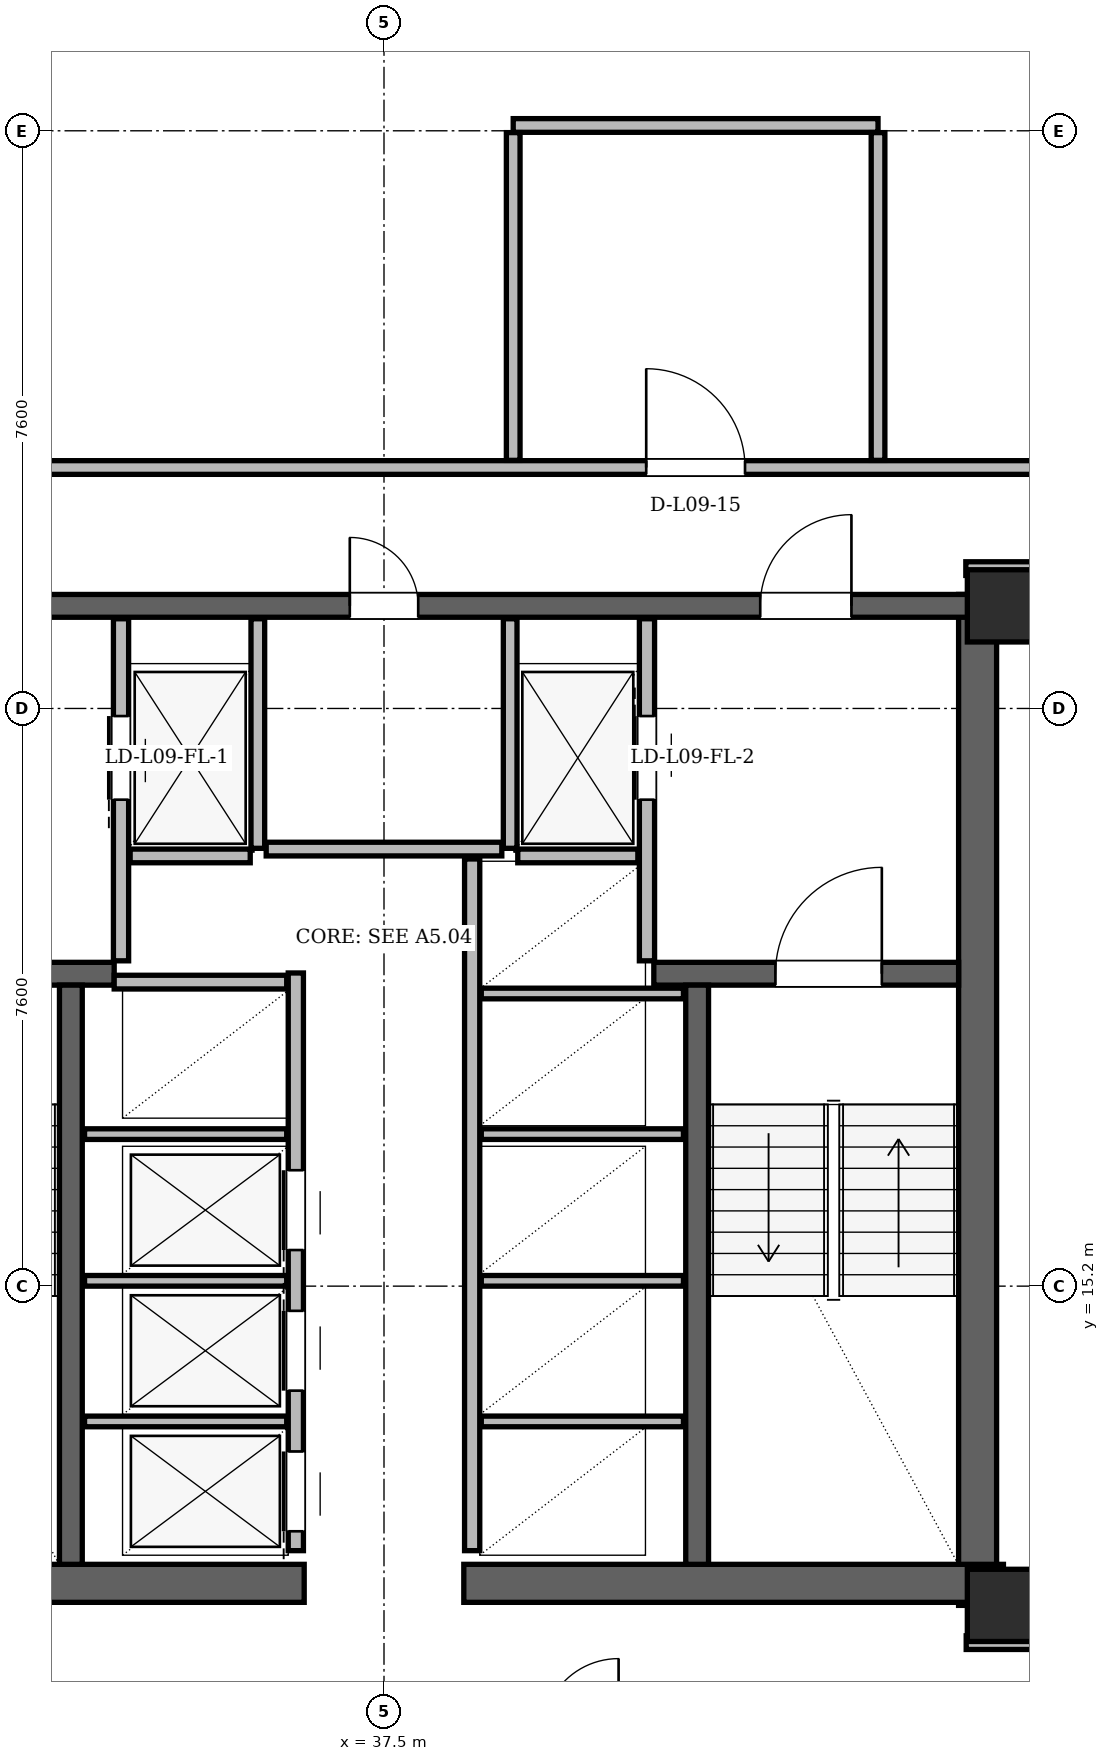
"""IFC4 building model, lengths in metres.
Left out: names, types, materials, properties, quantities, classifications, styles, units other than length and angle.
Written with IfcOpenShell. Run it as: python <this file> out.ifc"""

import sys

from ifc_helpers import new_model, si_unit, direction, frame, frame_2d, origin, origin_2d, place, context, subcontext, project, spatial, rectangle, hollow_rectangle, extrude, element, fill, save


model = new_model("IFC4")
c1 = context("Model", 3, precision=1e-05, world=origin(), true_north=direction((0.0, 1.0)))
c2 = subcontext(c1, "Body", "Model", "MODEL_VIEW")
j1 = project(units=[si_unit("LENGTHUNIT", "METRE"), si_unit("PLANEANGLEUNIT", "RADIAN")], contexts=[c1])
p1 = place(None, origin())
s1 = spatial("IfcSite", under=j1, at=p1, CompositionType="ELEMENT")
p2 = place(p1, origin())
s2 = spatial("IfcBuilding", under=s1, at=p2, CompositionType="ELEMENT")
p3 = place(p2, frame((0.0, 0.0, 38.1)))
s3 = spatial("IfcBuildingStorey", under=s2, at=p3, CompositionType="ELEMENT", Elevation=38.1)
for number, where, z_axis, x_axis in (
    (1, (45.65, 11.0, 0.0), (0.0, 0.0, 1.0), (1.0, 0.0, 0.0)),
    (2, (45.65, 24.15, 0.0), (0.0, 0.0, 1.0), (1.0, 0.0, 0.0)),
):
    element("IfcColumn", number, at=place(p3, frame(where, z_axis=z_axis, x_axis=x_axis)), inside=s3, PredefinedType="COLUMN", context=c2, shape_type="SweptSolid", body=[
        extrude(hollow_rectangle(XDim=0.95, YDim=0.95, WallThickness=0.08, at=origin_2d()), origin(), (0.0, 0.0, 1.0), 3.6),
    ])
p4 = place(p3, frame((45.31, 11.0, 0.0), z_axis=(0.0, 0.0, 1.0), x_axis=(0.0, 1.0, 0.0)))
e3 = element("IfcWall", 3, at=p4, inside=s3, PredefinedType="SHEAR", context=c2, shape_type="SweptSolid", body=[
    extrude(rectangle(XDim=13.3, YDim=0.5, at=frame_2d((6.65, 0.0))), origin(), (0.0, 0.0, 1.0), 3.36),
])
for number, where, z_axis, x_axis in (
    (4, (29.35, 11.29, 0.0), (0.0, 0.0, 1.0), (1.0, 0.0, 0.0)),
    (5, (38.55, 11.29, 0.0), (0.0, 0.0, 1.0), (1.0, 0.0, 0.0)),
):
    element("IfcWall", number, at=place(p3, frame(where, z_axis=z_axis, x_axis=x_axis)), inside=s3, PredefinedType="SHEAR", context=c2, shape_type="SweptSolid", body=[
        extrude(rectangle(XDim=7.1, YDim=0.5, at=frame_2d((3.55, 0.0))), origin(), (0.0, 0.0, 1.0), 3.36),
    ])
p5 = place(p3, frame((29.65, 24.15, 0.0), z_axis=(0.0, 0.0, 1.0), x_axis=(1.0, 0.0, 0.0)))
e6 = element("IfcWall", 6, at=p5, inside=s3, PredefinedType="SHEAR", context=c2, shape_type="SweptSolid", body=[
    extrude(rectangle(XDim=15.7, YDim=0.3, at=frame_2d((7.85, 0.0))), origin(), (0.0, 0.0, 1.0), 3.36),
])
p6 = place(p5, frame((1.7, 0.0, 0.0)))
e7 = element("IfcOpeningElement", 7, at=p6, cuts=e6, PredefinedType="OPENING", context=c2, shape_type="SweptSolid", body=[
    extrude(rectangle(XDim=1.2, YDim=2.2, at=frame_2d((0.6, 1.1))), frame((0.0, 0.15, 0.0), z_axis=(0.0, -1.0, 0.0), x_axis=(1.0, 0.0, 0.0)), (0.0, 0.0, 1.0), 0.3),
])
p7 = place(p5, frame((12.8, 0.0, 0.0)))
e8 = element("IfcOpeningElement", 8, at=p7, cuts=e6, PredefinedType="OPENING", context=c2, shape_type="SweptSolid", body=[
    extrude(rectangle(XDim=1.2, YDim=2.2, at=frame_2d((0.6, 1.1))), frame((0.0, 0.15, 0.0), z_axis=(0.0, -1.0, 0.0), x_axis=(1.0, 0.0, 0.0)), (0.0, 0.0, 1.0), 0.3),
])
p8 = place(p5, frame((7.4, 0.0, 0.0)))
e9 = element("IfcOpeningElement", 9, at=p8, cuts=e6, PredefinedType="OPENING", context=c2, shape_type="SweptSolid", body=[
    extrude(rectangle(XDim=0.9, YDim=2.05, at=frame_2d((0.45, 1.025))), frame((0.0, 0.15, 0.0), z_axis=(0.0, -1.0, 0.0), x_axis=(1.0, 0.0, 0.0)), (0.0, 0.0, 1.0), 0.3),
])
p9 = place(p3, frame((29.94, 19.31, 0.0), z_axis=(0.0, 0.0, 1.0), x_axis=(1.0, 0.0, 0.0)))
e10 = element("IfcWall", 10, at=p9, inside=s3, PredefinedType="SHEAR", context=c2, shape_type="SweptSolid", body=[
    extrude(rectangle(XDim=4.01, YDim=0.3, at=frame_2d((2.005, 0.0))), origin(), (0.0, 0.0, 1.0), 3.36),
])
p10 = place(p9, frame((1.01, 0.0, 0.0)))
e11 = element("IfcOpeningElement", 11, at=p10, cuts=e10, PredefinedType="OPENING", context=c2, shape_type="SweptSolid", body=[
    extrude(rectangle(XDim=1.4, YDim=2.2, at=frame_2d((0.7, 1.1))), frame((0.0, 0.15, 0.0), z_axis=(0.0, -1.0, 0.0), x_axis=(1.0, 0.0, 0.0)), (0.0, 0.0, 1.0), 0.3),
])
p11 = place(p3, frame((41.05, 19.31, 0.0), z_axis=(0.0, 0.0, 1.0), x_axis=(1.0, 0.0, 0.0)))
e12 = element("IfcWall", 12, at=p11, inside=s3, PredefinedType="SHEAR", context=c2, shape_type="SweptSolid", body=[
    extrude(rectangle(XDim=4.01, YDim=0.3, at=frame_2d((2.005, 0.0))), origin(), (0.0, 0.0, 1.0), 3.36),
])
p12 = place(p11, frame((1.6, 0.0, 0.0)))
e13 = element("IfcOpeningElement", 13, at=p12, cuts=e12, PredefinedType="OPENING", context=c2, shape_type="SweptSolid", body=[
    extrude(rectangle(XDim=1.4, YDim=2.2, at=frame_2d((0.7, 1.1))), frame((0.0, 0.15, 0.0), z_axis=(0.0, -1.0, 0.0), x_axis=(1.0, 0.0, 0.0)), (0.0, 0.0, 1.0), 0.3),
])
for number, where, z_axis, x_axis in (
    (14, (33.38, 11.54, 0.0), (0.0, 0.0, 1.0), (0.0, 1.0, 0.0)),
    (15, (41.62, 11.54, 0.0), (0.0, 0.0, 1.0), (0.0, 1.0, 0.0)),
):
    element("IfcWall", number, at=place(p3, frame(where, z_axis=z_axis, x_axis=x_axis)), inside=s3, PredefinedType="SHEAR", context=c2, shape_type="SweptSolid", body=[
        extrude(rectangle(XDim=7.62, YDim=0.3, at=frame_2d((3.81, 0.0))), origin(), (0.0, 0.0, 1.0), 3.36),
    ])
p13 = place(p3, frame((61.713, 15.014, 0.0), z_axis=(0.0, 0.0, 1.0), x_axis=(-0.499997221217, 0.86602700811, 0.0)))
e16 = element("IfcWall", 16, at=p13, inside=s3, PredefinedType="SOLIDWALL", context=c2, shape_type="SweptSolid", body=[
    extrude(rectangle(XDim=33.022, YDim=0.34, at=frame_2d((16.511, 0.0))), origin(), (0.0, 0.0, 1.0), 2.494),
])
p14 = place(p13, frame((7.404, 0.0, 0.0)))
e17 = element("IfcOpeningElement", 17, at=p14, cuts=e16, PredefinedType="OPENING", context=c2, shape_type="SweptSolid", body=[
    extrude(rectangle(XDim=1.5, YDim=2.2, at=frame_2d((0.75, 1.1))), frame((0.0, 0.17, 0.0), z_axis=(0.0, -1.0, 0.0), x_axis=(1.0, 0.0, 0.0)), (0.0, 0.0, 1.0), 0.34),
])
p15 = place(p13, frame((25.362, 0.0, 0.0)))
e18 = element("IfcOpeningElement", 18, at=p15, cuts=e16, PredefinedType="OPENING", context=c2, shape_type="SweptSolid", body=[
    extrude(rectangle(XDim=1.5, YDim=2.2, at=frame_2d((0.75, 1.1))), frame((0.0, 0.17, 0.0), z_axis=(0.0, -1.0, 0.0), x_axis=(1.0, 0.0, 0.0)), (0.0, 0.0, 1.0), 0.34),
])
p16 = place(p13, frame((1.657, 0.0, 0.85)))
e19 = element("IfcOpeningElement", 19, at=p16, cuts=e16, PredefinedType="OPENING", context=c2, shape_type="SweptSolid", body=[
    extrude(rectangle(XDim=1.2, YDim=1.48, at=frame_2d((0.6, 0.74))), frame((0.0, 0.17, 0.0), z_axis=(0.0, -1.0, 0.0), x_axis=(1.0, 0.0, 0.0)), (0.0, 0.0, 1.0), 0.34),
])
p17 = place(p13, frame((17.282, 0.0, 0.85)))
e20 = element("IfcOpeningElement", 20, at=p17, cuts=e16, PredefinedType="OPENING", context=c2, shape_type="SweptSolid", body=[
    extrude(rectangle(XDim=2.5, YDim=1.534, at=frame_2d((1.25, 0.767))), frame((0.0, 0.17, 0.0), z_axis=(0.0, -1.0, 0.0), x_axis=(1.0, 0.0, 0.0)), (0.0, 0.0, 1.0), 0.34),
])
p18 = place(p13, frame((10.692, 0.0, 0.85)))
e21 = element("IfcOpeningElement", 21, at=p18, cuts=e16, PredefinedType="OPENING", context=c2, shape_type="SweptSolid", body=[
    extrude(rectangle(XDim=1.2, YDim=1.48, at=frame_2d((0.6, 0.74))), frame((0.0, 0.17, 0.0), z_axis=(0.0, -1.0, 0.0), x_axis=(1.0, 0.0, 0.0)), (0.0, 0.0, 1.0), 0.34),
])
p19 = place(p13, frame((13.576, 0.0, 0.85)))
e22 = element("IfcOpeningElement", 22, at=p19, cuts=e16, PredefinedType="OPENING", context=c2, shape_type="SweptSolid", body=[
    extrude(rectangle(XDim=1.2, YDim=1.48, at=frame_2d((0.6, 0.74))), frame((0.0, 0.17, 0.0), z_axis=(0.0, -1.0, 0.0), x_axis=(1.0, 0.0, 0.0)), (0.0, 0.0, 1.0), 0.34),
])
p20 = place(p3, frame((34.04, 19.48, 0.0), z_axis=(0.0, 0.0, 1.0), x_axis=(0.0, 1.0, 0.0)))
e23 = element("IfcWall", 23, at=p20, inside=s3, PredefinedType="PARTITIONING", context=c2, shape_type="SweptSolid", body=[
    extrude(rectangle(XDim=4.5, YDim=0.2, at=frame_2d((2.25, 0.0))), origin(), (0.0, 0.0, 1.0), 2.4),
])
p21 = place(p20, frame((2.12, 0.0, 0.0)))
e24 = element("IfcOpeningElement", 24, at=p21, cuts=e23, PredefinedType="OPENING", context=c2, shape_type="SweptSolid", body=[
    extrude(rectangle(XDim=1.1, YDim=2.2, at=frame_2d((0.55, 1.1))), frame((0.0, 0.1, 0.0), z_axis=(0.0, -1.0, 0.0), x_axis=(1.0, 0.0, 0.0)), (0.0, 0.0, 1.0), 0.2),
])
p22 = place(p3, frame((35.84, 20.96, 0.0), z_axis=(0.0, 0.0, 1.0), x_axis=(0.0, 1.0, 0.0)))
e25 = element("IfcWall", 25, at=p22, inside=s3, PredefinedType="PARTITIONING", context=c2, shape_type="SweptSolid", body=[
    extrude(rectangle(XDim=3.02, YDim=0.18, at=frame_2d((1.51, 0.0))), origin(), (0.0, 0.0, 1.0), 2.4),
])
p23 = place(p3, frame((34.16, 20.86, 0.0), z_axis=(0.0, 0.0, 1.0), x_axis=(1.0, 0.0, 0.0)))
e26 = element("IfcWall", 26, at=p23, inside=s3, PredefinedType="PARTITIONING", context=c2, shape_type="SweptSolid", body=[
    extrude(rectangle(XDim=1.58, YDim=0.18, at=frame_2d((0.79, 0.0))), origin(), (0.0, 0.0, 1.0), 3.36),
])
p24 = place(p3, frame((40.96, 19.48, 0.0), z_axis=(0.0, 0.0, 1.0), x_axis=(0.0, 1.0, 0.0)))
e27 = element("IfcWall", 27, at=p24, inside=s3, PredefinedType="PARTITIONING", context=c2, shape_type="SweptSolid", body=[
    extrude(rectangle(XDim=4.5, YDim=0.2, at=frame_2d((2.25, 0.0))), origin(), (0.0, 0.0, 1.0), 2.4),
])
p25 = place(p24, frame((2.12, 0.0, 0.0)))
e28 = element("IfcOpeningElement", 28, at=p25, cuts=e27, PredefinedType="OPENING", context=c2, shape_type="SweptSolid", body=[
    extrude(rectangle(XDim=1.1, YDim=2.2, at=frame_2d((0.55, 1.1))), frame((0.0, 0.1, 0.0), z_axis=(0.0, -1.0, 0.0), x_axis=(1.0, 0.0, 0.0)), (0.0, 0.0, 1.0), 0.2),
])
p26 = place(p3, frame((39.16, 20.96, 0.0), z_axis=(0.0, 0.0, 1.0), x_axis=(0.0, 1.0, 0.0)))
e29 = element("IfcWall", 29, at=p26, inside=s3, PredefinedType="PARTITIONING", context=c2, shape_type="SweptSolid", body=[
    extrude(rectangle(XDim=3.02, YDim=0.18, at=frame_2d((1.51, 0.0))), origin(), (0.0, 0.0, 1.0), 2.4),
])
p27 = place(p3, frame((39.26, 20.86, 0.0), z_axis=(0.0, 0.0, 1.0), x_axis=(1.0, 0.0, 0.0)))
e30 = element("IfcWall", 30, at=p27, inside=s3, PredefinedType="PARTITIONING", context=c2, shape_type="SweptSolid", body=[
    extrude(rectangle(XDim=1.58, YDim=0.18, at=frame_2d((0.79, 0.0))), origin(), (0.0, 0.0, 1.0), 3.36),
])
p28 = place(p3, frame((36.34, 11.72, 0.0), z_axis=(0.0, 0.0, 1.0), x_axis=(0.0, 1.0, 0.0)))
e31 = element("IfcWall", 31, at=p28, inside=s3, PredefinedType="PARTITIONING", context=c2, shape_type="SweptSolid", body=[
    extrude(rectangle(XDim=7.6, YDim=0.2, at=frame_2d((3.8, 0.0))), origin(), (0.0, 0.0, 1.0), 3.36),
])
p29 = place(p28, frame((0.255, 0.0, 0.0)))
e32 = element("IfcOpeningElement", 32, at=p29, cuts=e31, PredefinedType="OPENING", context=c2, shape_type="SweptSolid", body=[
    extrude(rectangle(XDim=1.05, YDim=2.15, at=frame_2d((0.525, 1.075))), frame((0.0, 0.1, 0.0), z_axis=(0.0, -1.0, 0.0), x_axis=(1.0, 0.0, 0.0)), (0.0, 0.0, 1.0), 0.2),
])
p30 = place(p28, frame((2.105, 0.0, 0.0)))
e33 = element("IfcOpeningElement", 33, at=p30, cuts=e31, PredefinedType="OPENING", context=c2, shape_type="SweptSolid", body=[
    extrude(rectangle(XDim=1.05, YDim=2.15, at=frame_2d((0.525, 1.075))), frame((0.0, 0.1, 0.0), z_axis=(0.0, -1.0, 0.0), x_axis=(1.0, 0.0, 0.0)), (0.0, 0.0, 1.0), 0.2),
])
p31 = place(p28, frame((3.955, 0.0, 0.0)))
e34 = element("IfcOpeningElement", 34, at=p31, cuts=e31, PredefinedType="OPENING", context=c2, shape_type="SweptSolid", body=[
    extrude(rectangle(XDim=1.05, YDim=2.15, at=frame_2d((0.525, 1.075))), frame((0.0, 0.1, 0.0), z_axis=(0.0, -1.0, 0.0), x_axis=(1.0, 0.0, 0.0)), (0.0, 0.0, 1.0), 0.2),
])
p32 = place(p3, frame((33.95, 19.2, 0.0), z_axis=(0.0, 0.0, 1.0), x_axis=(1.0, 0.0, 0.0)))
e35 = element("IfcWall", 35, at=p32, inside=s3, PredefinedType="PARTITIONING", context=c2, shape_type="SweptSolid", body=[
    extrude(rectangle(XDim=2.27, YDim=0.18, at=frame_2d((1.135, 0.0))), origin(), (0.0, 0.0, 1.0), 3.36),
])
for number, where, z_axis, x_axis in (
    (36, (33.56, 13.42, 0.0), (0.0, 0.0, 1.0), (1.0, 0.0, 0.0)),
    (37, (33.56, 15.27, 0.0), (0.0, 0.0, 1.0), (1.0, 0.0, 0.0)),
    (38, (33.56, 17.2, 0.0), (0.0, 0.0, 1.0), (1.0, 0.0, 0.0)),
):
    element("IfcWall", number, at=place(p3, frame(where, z_axis=z_axis, x_axis=x_axis)), inside=s3, PredefinedType="PARTITIONING", context=c2, shape_type="SweptSolid", body=[
        extrude(rectangle(XDim=2.66, YDim=0.14, at=frame_2d((1.33, 0.0))), origin(), (0.0, 0.0, 1.0), 3.36),
    ])
p33 = place(p3, frame((38.66, 11.72, 0.0), z_axis=(0.0, 0.0, 1.0), x_axis=(0.0, 1.0, 0.0)))
e39 = element("IfcWall", 39, at=p33, inside=s3, PredefinedType="PARTITIONING", context=c2, shape_type="SweptSolid", body=[
    extrude(rectangle(XDim=9.1, YDim=0.2, at=frame_2d((4.55, 0.0))), origin(), (0.0, 0.0, 1.0), 3.36),
])
for number, where, z_axis, x_axis in (
    (40, (38.78, 13.42, 0.0), (0.0, 0.0, 1.0), (1.0, 0.0, 0.0)),
    (41, (38.78, 15.27, 0.0), (0.0, 0.0, 1.0), (1.0, 0.0, 0.0)),
    (42, (38.78, 17.2, 0.0), (0.0, 0.0, 1.0), (1.0, 0.0, 0.0)),
    (43, (38.78, 19.05, 0.0), (0.0, 0.0, 1.0), (1.0, 0.0, 0.0)),
):
    element("IfcWall", number, at=place(p3, frame(where, z_axis=z_axis, x_axis=x_axis)), inside=s3, PredefinedType="PARTITIONING", context=c2, shape_type="SweptSolid", body=[
        extrude(rectangle(XDim=2.66, YDim=0.14, at=frame_2d((1.33, 0.0))), origin(), (0.0, 0.0, 1.0), 3.36),
    ])
p34 = place(p3, frame((35.95, 20.95, 0.0), z_axis=(0.0, 0.0, 1.0), x_axis=(1.0, 0.0, 0.0)))
e44 = element("IfcWall", 44, at=p34, inside=s3, PredefinedType="PARTITIONING", context=c2, shape_type="SweptSolid", body=[
    extrude(rectangle(XDim=3.1, YDim=0.18, at=frame_2d((1.55, 0.0))), origin(), (0.0, 0.0, 1.0), 3.36),
])
p35 = place(p3, frame((45.16, 10.51, 0.0), z_axis=(0.0, 0.0, 1.0), x_axis=(1.0, 0.0, 0.0)))
e45 = element("IfcWall", 45, at=p35, inside=s3, PredefinedType="PARTITIONING", context=c2, shape_type="SweptSolid", body=[
    extrude(rectangle(XDim=0.98, YDim=0.18, at=frame_2d((0.49, 0.0))), origin(), (0.0, 0.0, 1.0), 2.738),
])
p36 = place(p3, frame((45.155, 24.64, 0.0), z_axis=(0.0, 0.0, 1.0), x_axis=(1.0, 0.0, 0.0)))
e46 = element("IfcWall", 46, at=p36, inside=s3, PredefinedType="PARTITIONING", context=c2, shape_type="SweptSolid", body=[
    extrude(rectangle(XDim=0.99, YDim=0.18, at=frame_2d((0.495, 0.0))), origin(), (0.0, 0.0, 1.0), 2.738),
])
p37 = place(p3, frame((27.55, 25.97, 0.0), z_axis=(0.0, 0.0, 1.0), x_axis=(1.0, 0.0, 0.0)))
e47 = element("IfcWall", 47, at=p37, inside=s3, PredefinedType="PARTITIONING", context=c2, shape_type="SweptSolid", body=[
    extrude(rectangle(XDim=19.9, YDim=0.18, at=frame_2d((9.95, 0.0))), origin(), (0.0, 0.0, 1.0), 2.738),
])
p38 = place(p37, frame((13.4, 0.0, 0.0)))
e48 = element("IfcOpeningElement", 48, at=p38, cuts=e47, PredefinedType="OPENING", context=c2, shape_type="SweptSolid", body=[
    extrude(rectangle(XDim=1.3, YDim=2.2, at=frame_2d((0.65, 1.1))), frame((0.0, 0.09, 0.0), z_axis=(0.0, -1.0, 0.0), x_axis=(1.0, 0.0, 0.0)), (0.0, 0.0, 1.0), 0.18),
])
p39 = place(p3, frame((39.2, 30.47, 0.0), z_axis=(0.0, 0.0, 1.0), x_axis=(1.0, 0.0, 0.0)))
e49 = element("IfcWall", 49, at=p39, inside=s3, PredefinedType="PARTITIONING", context=c2, shape_type="SweptSolid", body=[
    extrude(rectangle(XDim=4.8, YDim=0.18, at=frame_2d((2.4, 0.0))), origin(), (0.0, 0.0, 1.0), 3.36),
])
p40 = place(p3, frame((39.2, 26.064, 0.0), z_axis=(0.0, 0.0, 1.0), x_axis=(0.0, 1.0, 0.0)))
e50 = element("IfcWall", 50, at=p40, inside=s3, PredefinedType="PARTITIONING", context=c2, shape_type="SweptSolid", body=[
    extrude(rectangle(XDim=4.312, YDim=0.18, at=frame_2d((2.156, 0.0))), origin(), (0.0, 0.0, 1.0), 3.36),
])
p41 = place(p3, frame((44.0, 26.064, 0.0), z_axis=(0.0, 0.0, 1.0), x_axis=(0.0, 1.0, 0.0)))
e51 = element("IfcWall", 51, at=p41, inside=s3, PredefinedType="PARTITIONING", context=c2, shape_type="SweptSolid", body=[
    extrude(rectangle(XDim=4.312, YDim=0.18, at=frame_2d((2.156, 0.0))), origin(), (0.0, 0.0, 1.0), 2.946),
])
p42 = place(p21, origin())
e52 = element("IfcDoor", 52, at=p42, inside=s3, OperationType="SLIDING_TO_LEFT", PredefinedType="DOOR", context=c2, shape_type="SweptSolid", body=[
    extrude(rectangle(XDim=1.1, YDim=2.2, at=frame_2d((0.55, 1.1))), frame((0.0, 0.025, 0.0), z_axis=(0.0, -1.0, 0.0), x_axis=(1.0, 0.0, 0.0)), (0.0, 0.0, 1.0), 0.05),
])
fill(e24, e52)
p43 = place(p25, origin())
e53 = element("IfcDoor", 53, at=p43, inside=s3, OperationType="SLIDING_TO_RIGHT", PredefinedType="DOOR", context=c2, shape_type="SweptSolid", body=[
    extrude(rectangle(XDim=1.1, YDim=2.2, at=frame_2d((0.55, 1.1))), frame((0.0, 0.025, 0.0), z_axis=(0.0, -1.0, 0.0), x_axis=(1.0, 0.0, 0.0)), (0.0, 0.0, 1.0), 0.05),
])
fill(e28, e53)
p44 = place(p29, origin())
e54 = element("IfcDoor", 54, at=p44, inside=s3, OperationType="SLIDING_TO_LEFT", PredefinedType="DOOR", context=c2, shape_type="SweptSolid", body=[
    extrude(rectangle(XDim=1.05, YDim=2.15, at=frame_2d((0.525, 1.075))), frame((0.0, 0.025, 0.0), z_axis=(0.0, -1.0, 0.0), x_axis=(1.0, 0.0, 0.0)), (0.0, 0.0, 1.0), 0.05),
])
fill(e32, e54)
p45 = place(p30, origin())
e55 = element("IfcDoor", 55, at=p45, inside=s3, OperationType="SLIDING_TO_RIGHT", PredefinedType="DOOR", context=c2, shape_type="SweptSolid", body=[
    extrude(rectangle(XDim=1.05, YDim=2.15, at=frame_2d((0.525, 1.075))), frame((0.0, 0.025, 0.0), z_axis=(0.0, -1.0, 0.0), x_axis=(1.0, 0.0, 0.0)), (0.0, 0.0, 1.0), 0.05),
])
fill(e33, e55)
p46 = place(p31, origin())
e56 = element("IfcDoor", 56, at=p46, inside=s3, OperationType="SLIDING_TO_LEFT", PredefinedType="DOOR", context=c2, shape_type="SweptSolid", body=[
    extrude(rectangle(XDim=1.05, YDim=2.15, at=frame_2d((0.525, 1.075))), frame((0.0, 0.025, 0.0), z_axis=(0.0, -1.0, 0.0), x_axis=(1.0, 0.0, 0.0)), (0.0, 0.0, 1.0), 0.05),
])
fill(e34, e56)
p47 = place(p12, origin())
e57 = element("IfcDoor", 57, at=p47, inside=s3, OperationType="SINGLE_SWING_RIGHT", PredefinedType="DOOR", context=c2, shape_type="SweptSolid", body=[
    extrude(rectangle(XDim=1.4, YDim=2.2, at=frame_2d((0.7, 1.1))), frame((0.0, 0.025, 0.0), z_axis=(0.0, -1.0, 0.0), x_axis=(1.0, 0.0, 0.0)), (0.0, 0.0, 1.0), 0.05),
])
fill(e13, e57)
p48 = place(p7, origin())
e58 = element("IfcDoor", 58, at=p48, inside=s3, OperationType="SINGLE_SWING_RIGHT", PredefinedType="DOOR", context=c2, shape_type="SweptSolid", body=[
    extrude(rectangle(XDim=1.2, YDim=2.2, at=frame_2d((0.6, 1.1))), frame((0.0, 0.025, 0.0), z_axis=(0.0, -1.0, 0.0), x_axis=(1.0, 0.0, 0.0)), (0.0, 0.0, 1.0), 0.05),
])
fill(e8, e58)
p49 = place(p8, origin())
e59 = element("IfcDoor", 59, at=p49, inside=s3, OperationType="SINGLE_SWING_LEFT", PredefinedType="DOOR", context=c2, shape_type="SweptSolid", body=[
    extrude(rectangle(XDim=0.9, YDim=2.05, at=frame_2d((0.45, 1.025))), frame((0.0, 0.025, 0.0), z_axis=(0.0, -1.0, 0.0), x_axis=(1.0, 0.0, 0.0)), (0.0, 0.0, 1.0), 0.05),
])
fill(e9, e59)
p50 = place(p38, origin())
e60 = element("IfcDoor", 60, at=p50, inside=s3, OperationType="SINGLE_SWING_LEFT", PredefinedType="DOOR", context=c2, shape_type="SweptSolid", body=[
    extrude(rectangle(XDim=1.3, YDim=2.2, at=frame_2d((0.65, 1.1))), frame((0.0, 0.025, 0.0), z_axis=(0.0, -1.0, 0.0), x_axis=(1.0, 0.0, 0.0)), (0.0, 0.0, 1.0), 0.05),
])
fill(e48, e60)
save(model, sys.argv[1])
